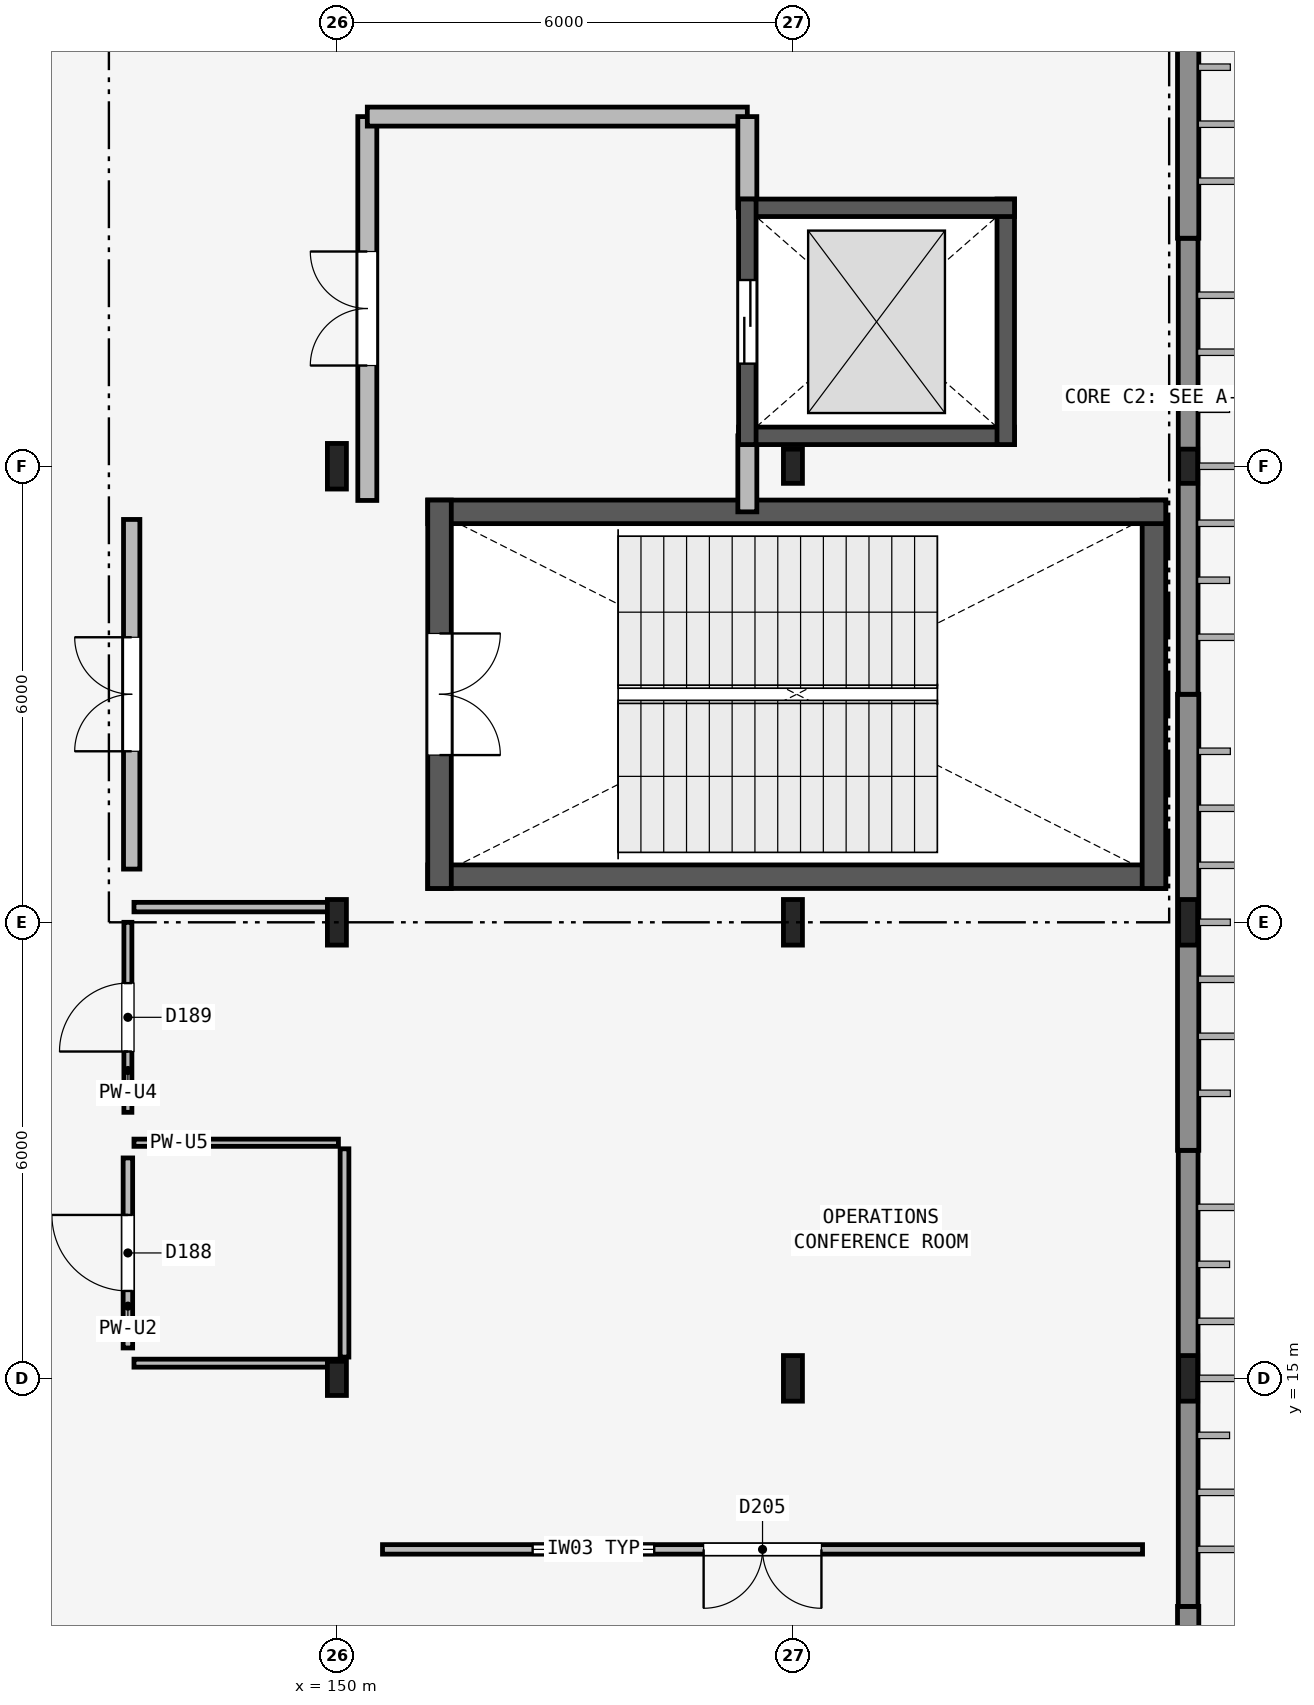
"""IFC4 building model, lengths in metres.
Left out: names, types, materials, properties, quantities, classifications, styles, units other than length and angle.
Written with IfcOpenShell. Run it as: python <this file> out.ifc"""

import sys

from ifc_helpers import new_model, si_unit, direction, frame, frame_2d, origin, origin_2d, place, context, subcontext, project, spatial, rectangle, i_section, extrude, element, fill, save


model = new_model("IFC4")
c1 = context("Model", 3, precision=1e-05, world=origin(), true_north=direction((0.0, 1.0)))
c2 = subcontext(c1, "Body", "Model", "MODEL_VIEW")
j1 = project(units=[si_unit("LENGTHUNIT", "METRE"), si_unit("PLANEANGLEUNIT", "RADIAN")], contexts=[c1])
p1 = place(None, origin())
s1 = spatial("IfcSite", under=j1, at=p1, CompositionType="ELEMENT")
p2 = place(p1, origin())
s2 = spatial("IfcBuilding", under=s1, at=p2, CompositionType="ELEMENT")
p3 = place(p2, frame((0.0, 0.0, 4.8)))
s3 = spatial("IfcBuildingStorey", under=s2, at=p3, CompositionType="ELEMENT", Elevation=4.8)
p4 = place(p3, frame((150.0, 15.0, 0.0), z_axis=(0.0, 0.0, 1.0), x_axis=(1.0, 0.0, 0.0)))
e1 = element("IfcColumn", 1, at=p4, inside=s3, PredefinedType="COLUMN", context=c2, shape_type="SweptSolid", body=[
    extrude(i_section(OverallWidth=0.25, OverallDepth=0.45, WebThickness=0.011, FlangeThickness=0.014, FilletRadius=0.015, at=origin_2d()), origin(), (0.0, 0.0, 1.0), 4.5),
])
for number, where, z_axis, x_axis in (
    (2, (150.0, 21.0, 0.0), (0.0, 0.0, 1.0), (1.0, 0.0, 0.0)),
    (3, (150.0, 27.0, 0.0), (0.0, 0.0, 1.0), (1.0, 0.0, 0.0)),
    (4, (156.0, 15.0, 0.0), (0.0, 0.0, 1.0), (1.0, 0.0, 0.0)),
    (5, (156.0, 21.0, 0.0), (0.0, 0.0, 1.0), (1.0, 0.0, 0.0)),
):
    element("IfcColumn", number, at=place(p3, frame(where, z_axis=z_axis, x_axis=x_axis)), inside=s3, PredefinedType="COLUMN", context=c2, shape_type="SweptSolid", body=[
        extrude(i_section(OverallWidth=0.25, OverallDepth=0.6, WebThickness=0.012, FlangeThickness=0.024, FilletRadius=0.017, at=origin_2d()), origin(), (0.0, 0.0, 1.0), 4.5),
    ])
p5 = place(p3, frame((156.0, 27.0, 0.0), z_axis=(0.0, 0.0, 1.0), x_axis=(1.0, 0.0, 0.0)))
e6 = element("IfcColumn", 6, at=p5, inside=s3, PredefinedType="COLUMN", context=c2, shape_type="SweptSolid", body=[
    extrude(i_section(OverallWidth=0.25, OverallDepth=0.45, WebThickness=0.011, FlangeThickness=0.014, FilletRadius=0.015, at=origin_2d()), origin(), (0.0, 0.0, 1.0), 4.5),
])
for number, where, z_axis, x_axis in (
    (7, (161.2, 15.0, 0.0), (0.0, 0.0, 1.0), (1.0, 0.0, 0.0)),
    (8, (161.2, 21.0, 0.0), (0.0, 0.0, 1.0), (1.0, 0.0, 0.0)),
):
    element("IfcColumn", number, at=place(p3, frame(where, z_axis=z_axis, x_axis=x_axis)), inside=s3, PredefinedType="COLUMN", context=c2, shape_type="SweptSolid", body=[
        extrude(i_section(OverallWidth=0.25, OverallDepth=0.6, WebThickness=0.012, FlangeThickness=0.024, FilletRadius=0.017, at=origin_2d()), origin(), (0.0, 0.0, 1.0), 4.5),
    ])
p6 = place(p3, frame((161.2, 27.0, 0.0), z_axis=(0.0, 0.0, 1.0), x_axis=(1.0, 0.0, 0.0)))
e9 = element("IfcColumn", 9, at=p6, inside=s3, PredefinedType="COLUMN", context=c2, shape_type="SweptSolid", body=[
    extrude(i_section(OverallWidth=0.25, OverallDepth=0.45, WebThickness=0.011, FlangeThickness=0.014, FilletRadius=0.015, at=origin_2d()), origin(), (0.0, 0.0, 1.0), 4.5),
])
p7 = place(p3, frame((161.2, 6.0, 0.0), z_axis=(0.0, 0.0, 1.0), x_axis=(0.0, 1.0, 0.0)))
e10 = element("IfcWall", 10, at=p7, inside=s3, PredefinedType="SOLIDWALL", context=c2, shape_type="SweptSolid", body=[
    extrude(rectangle(XDim=6.0, YDim=0.28, at=frame_2d((3.0, 0.0))), origin(), (0.0, 0.0, 1.0), 3.74),
])
p8 = place(p3, frame((161.2, 12.0, 0.0), z_axis=(0.0, 0.0, 1.0), x_axis=(0.0, 1.0, 0.0)))
e11 = element("IfcWall", 11, at=p8, inside=s3, PredefinedType="SOLIDWALL", context=c2, shape_type="SweptSolid", body=[
    extrude(rectangle(XDim=6.0, YDim=0.26, at=frame_2d((3.0, 0.0))), origin(), (0.0, 0.0, 1.0), 3.74),
])
p9 = place(p3, frame((161.2, 18.0, 0.0), z_axis=(0.0, 0.0, 1.0), x_axis=(0.0, 1.0, 0.0)))
e12 = element("IfcWall", 12, at=p9, inside=s3, PredefinedType="SOLIDWALL", context=c2, shape_type="SweptSolid", body=[
    extrude(rectangle(XDim=6.0, YDim=0.28, at=frame_2d((3.0, 0.0))), origin(), (0.0, 0.0, 1.0), 3.69),
])
p10 = place(p3, frame((161.2, 24.0, 0.0), z_axis=(0.0, 0.0, 1.0), x_axis=(0.0, 1.0, 0.0)))
e13 = element("IfcWall", 13, at=p10, inside=s3, PredefinedType="SOLIDWALL", context=c2, shape_type="SweptSolid", body=[
    extrude(rectangle(XDim=6.0, YDim=0.26, at=frame_2d((3.0, 0.0))), origin(), (0.0, 0.0, 1.0), 3.69),
])
p11 = place(p3, frame((161.2, 30.0, 0.0), z_axis=(0.0, 0.0, 1.0), x_axis=(0.0, 1.0, 0.0)))
e14 = element("IfcWall", 14, at=p11, inside=s3, PredefinedType="SOLIDWALL", context=c2, shape_type="SweptSolid", body=[
    extrude(rectangle(XDim=6.0, YDim=0.28, at=frame_2d((3.0, 0.0))), origin(), (0.0, 0.0, 1.0), 3.74),
])
p12 = place(p3, frame((151.195, 21.6, 0.0), z_axis=(0.0, 0.0, 1.0), x_axis=(1.0, 0.0, 0.0)))
e15 = element("IfcWall", 15, at=p12, inside=s3, PredefinedType="SHEAR", context=c2, shape_type="SweptSolid", body=[
    extrude(rectangle(XDim=9.71, YDim=0.31, at=frame_2d((4.855, 0.0))), origin(), (0.0, 0.0, 1.0), 4.36),
])
p13 = place(p3, frame((160.75, 21.445, 0.0), z_axis=(0.0, 0.0, 1.0), x_axis=(0.0, 1.0, 0.0)))
e16 = element("IfcWall", 16, at=p13, inside=s3, PredefinedType="SHEAR", context=c2, shape_type="SweptSolid", body=[
    extrude(rectangle(XDim=5.11, YDim=0.31, at=frame_2d((2.555, 0.0))), origin(), (0.0, 0.0, 1.0), 4.36),
])
p14 = place(p3, frame((160.905, 26.4, 0.0), z_axis=(0.0, 0.0, 1.0), x_axis=(-1.0, 0.0, 0.0)))
e17 = element("IfcWall", 17, at=p14, inside=s3, PredefinedType="SHEAR", context=c2, shape_type="SweptSolid", body=[
    extrude(rectangle(XDim=9.71, YDim=0.31, at=frame_2d((4.855, 0.0))), origin(), (0.0, 0.0, 1.0), 4.36),
])
p15 = place(p3, frame((151.35, 26.555, 0.0), z_axis=(0.0, 0.0, 1.0), x_axis=(0.0, -1.0, 0.0)))
e18 = element("IfcWall", 18, at=p15, inside=s3, PredefinedType="SHEAR", context=c2, shape_type="SweptSolid", body=[
    extrude(rectangle(XDim=5.11, YDim=0.31, at=frame_2d((2.555, 0.0))), origin(), (0.0, 0.0, 1.0), 4.36),
])
p16 = place(p15, frame((1.755, 0.0, 0.0)))
e19 = element("IfcOpeningElement", 19, at=p16, cuts=e18, PredefinedType="OPENING", context=c2, shape_type="SweptSolid", body=[
    extrude(rectangle(XDim=1.6, YDim=2.2, at=frame_2d((0.8, 1.1))), frame((0.0, 0.165, 0.0), z_axis=(0.0, -1.0, 0.0), x_axis=(1.0, 0.0, 0.0)), (0.0, 0.0, 1.0), 0.33),
])
p17 = place(p3, frame((147.3, 21.7, 0.0), z_axis=(0.0, 0.0, 1.0), x_axis=(0.0, 1.0, 0.0)))
e20 = element("IfcWall", 20, at=p17, inside=s3, PredefinedType="PARTITIONING", context=c2, shape_type="SweptSolid", body=[
    extrude(rectangle(XDim=4.6, YDim=0.215, at=frame_2d((2.3, 0.0))), origin(), (0.0, 0.0, 1.0), 4.19),
])
p18 = place(p17, frame((1.55, 0.0, 0.0)))
e21 = element("IfcOpeningElement", 21, at=p18, cuts=e20, PredefinedType="OPENING", context=c2, shape_type="SweptSolid", body=[
    extrude(rectangle(XDim=1.5, YDim=2.15, at=frame_2d((0.75, 1.075))), frame((0.0, 0.117, 0.0), z_axis=(0.0, -1.0, 0.0), x_axis=(1.0, 0.0, 0.0)), (0.0, 0.0, 1.0), 0.235),
])
p19 = place(p3, frame((150.4, 26.55, 0.0), z_axis=(0.0, 0.0, 1.0), x_axis=(0.0, 1.0, 0.0)))
e22 = element("IfcWall", 22, at=p19, inside=s3, PredefinedType="PARTITIONING", context=c2, shape_type="SweptSolid", body=[
    extrude(rectangle(XDim=5.05, YDim=0.25, at=frame_2d((2.525, 0.0))), origin(), (0.0, 0.0, 1.0), 3.64),
])
p20 = place(p19, frame((1.775, 0.0, 0.0)))
e23 = element("IfcOpeningElement", 23, at=p20, cuts=e22, PredefinedType="OPENING", context=c2, shape_type="SweptSolid", body=[
    extrude(rectangle(XDim=1.5, YDim=2.15, at=frame_2d((0.75, 1.075))), frame((0.0, 0.135, 0.0), z_axis=(0.0, -1.0, 0.0), x_axis=(1.0, 0.0, 0.0)), (0.0, 0.0, 1.0), 0.27),
])
p21 = place(p3, frame((150.4, 31.6, 0.0), z_axis=(0.0, 0.0, 1.0), x_axis=(1.0, 0.0, 0.0)))
e24 = element("IfcWall", 24, at=p21, inside=s3, PredefinedType="PARTITIONING", context=c2, shape_type="SweptSolid", body=[
    extrude(rectangle(XDim=5.0, YDim=0.25, at=frame_2d((2.5, 0.0))), origin(), (0.0, 0.0, 1.0), 3.84),
])
p22 = place(p3, frame((155.4, 30.4, 0.0), z_axis=(0.0, 0.0, 1.0), x_axis=(0.0, 1.0, 0.0)))
e25 = element("IfcWall", 25, at=p22, inside=s3, PredefinedType="PARTITIONING", context=c2, shape_type="SweptSolid", body=[
    extrude(rectangle(XDim=1.2, YDim=0.25, at=frame_2d((0.6, 0.0))), origin(), (0.0, 0.0, 1.0), 4.19),
])
p23 = place(p3, frame((155.4, 26.4, 0.0), z_axis=(0.0, 0.0, 1.0), x_axis=(0.0, 1.0, 0.0)))
e26 = element("IfcWall", 26, at=p23, inside=s3, PredefinedType="PARTITIONING", context=c2, shape_type="SweptSolid", body=[
    extrude(rectangle(XDim=1.0, YDim=0.25, at=frame_2d((0.5, 0.0))), origin(), (0.0, 0.0, 1.0), 3.64),
])
p24 = place(p3, frame((155.285, 27.4, 0.0), z_axis=(0.0, 0.0, 1.0), x_axis=(1.0, 0.0, 0.0)))
e27 = element("IfcWall", 27, at=p24, inside=s3, PredefinedType="SHEAR", context=c2, shape_type="SweptSolid", body=[
    extrude(rectangle(XDim=3.63, YDim=0.23, at=frame_2d((1.815, 0.0))), origin(), (0.0, 0.0, 1.0), 4.5),
])
p25 = place(p3, frame((158.8, 27.285, 0.0), z_axis=(0.0, 0.0, 1.0), x_axis=(0.0, 1.0, 0.0)))
e28 = element("IfcWall", 28, at=p25, inside=s3, PredefinedType="SHEAR", context=c2, shape_type="SweptSolid", body=[
    extrude(rectangle(XDim=3.23, YDim=0.23, at=frame_2d((1.615, 0.0))), origin(), (0.0, 0.0, 1.0), 4.5),
])
p26 = place(p3, frame((158.915, 30.4, 0.0), z_axis=(0.0, 0.0, 1.0), x_axis=(-1.0, 0.0, 0.0)))
e29 = element("IfcWall", 29, at=p26, inside=s3, PredefinedType="SHEAR", context=c2, shape_type="SweptSolid", body=[
    extrude(rectangle(XDim=3.63, YDim=0.23, at=frame_2d((1.815, 0.0))), origin(), (0.0, 0.0, 1.0), 4.5),
])
p27 = place(p3, frame((155.4, 30.515, 0.0), z_axis=(0.0, 0.0, 1.0), x_axis=(0.0, -1.0, 0.0)))
e30 = element("IfcWall", 30, at=p27, inside=s3, PredefinedType="SHEAR", context=c2, shape_type="SweptSolid", body=[
    extrude(rectangle(XDim=3.23, YDim=0.23, at=frame_2d((1.615, 0.0))), origin(), (0.0, 0.0, 1.0), 4.5),
])
p28 = place(p27, frame((1.065, 0.0, 0.0)))
e31 = element("IfcOpeningElement", 31, at=p28, cuts=e30, PredefinedType="OPENING", context=c2, shape_type="SweptSolid", body=[
    extrude(rectangle(XDim=1.1, YDim=2.2, at=frame_2d((0.55, 1.1))), frame((0.0, 0.125, 0.0), z_axis=(0.0, -1.0, 0.0), x_axis=(1.0, 0.0, 0.0)), (0.0, 0.0, 1.0), 0.25),
])
p29 = place(p3, frame((147.25, 15.4, 0.0), z_axis=(0.0, 0.0, 1.0), x_axis=(0.0, 1.0, 0.0)))
e32 = element("IfcWall", 32, at=p29, inside=s3, PredefinedType="PARTITIONING", context=c2, shape_type="SweptSolid", body=[
    extrude(rectangle(XDim=2.5, YDim=0.125, at=frame_2d((1.25, 0.0))), origin(), (0.0, 0.0, 1.0), 4.19),
])
p30 = place(p29, frame((0.75, 0.0, 0.0)))
e33 = element("IfcOpeningElement", 33, at=p30, cuts=e32, PredefinedType="OPENING", context=c2, shape_type="SweptSolid", body=[
    extrude(rectangle(XDim=1.0, YDim=2.1, at=frame_2d((0.5, 1.05))), frame((0.0, 0.073, 0.0), z_axis=(0.0, -1.0, 0.0), x_axis=(1.0, 0.0, 0.0)), (0.0, 0.0, 1.0), 0.145),
])
p31 = place(p3, frame((147.25, 18.5, 0.0), z_axis=(0.0, 0.0, 1.0), x_axis=(0.0, 1.0, 0.0)))
e34 = element("IfcWall", 34, at=p31, inside=s3, PredefinedType="PARTITIONING", context=c2, shape_type="SweptSolid", body=[
    extrude(rectangle(XDim=2.5, YDim=0.105, at=frame_2d((1.25, 0.0))), origin(), (0.0, 0.0, 1.0), 3.59),
])
p32 = place(p31, frame((0.8, 0.0, 0.0)))
e35 = element("IfcOpeningElement", 35, at=p32, cuts=e34, PredefinedType="OPENING", context=c2, shape_type="SweptSolid", body=[
    extrude(rectangle(XDim=0.9, YDim=2.1, at=frame_2d((0.45, 1.05))), frame((0.0, 0.062, 0.0), z_axis=(0.0, -1.0, 0.0), x_axis=(1.0, 0.0, 0.0)), (0.0, 0.0, 1.0), 0.125),
])
p33 = place(p3, frame((160.6, 12.75, 0.0), z_axis=(0.0, 0.0, 1.0), x_axis=(-1.0, 0.0, 0.0)))
e36 = element("IfcWall", 36, at=p33, inside=s3, PredefinedType="PARTITIONING", context=c2, shape_type="SweptSolid", body=[
    extrude(rectangle(XDim=10.0, YDim=0.125, at=frame_2d((5.0, 0.0))), origin(), (0.0, 0.0, 1.0), 3.783),
])
p34 = place(p33, frame((4.225, 0.0, 0.0)))
e37 = element("IfcOpeningElement", 37, at=p34, cuts=e36, PredefinedType="OPENING", context=c2, shape_type="SweptSolid", body=[
    extrude(rectangle(XDim=1.55, YDim=2.2, at=frame_2d((0.775, 1.1))), frame((0.0, 0.073, 0.0), z_axis=(0.0, -1.0, 0.0), x_axis=(1.0, 0.0, 0.0)), (0.0, 0.0, 1.0), 0.145),
])
p35 = place(p33, frame((6.425, 0.0, 1.05)))
e38 = element("IfcOpeningElement", 38, at=p35, cuts=e36, PredefinedType="OPENING", context=c2, shape_type="SweptSolid", body=[
    extrude(rectangle(XDim=1.6, YDim=1.1, at=frame_2d((0.8, 0.55))), frame((0.0, 0.073, 0.0), z_axis=(0.0, -1.0, 0.0), x_axis=(1.0, 0.0, 0.0)), (0.0, 0.0, 1.0), 0.145),
])
p36 = place(p3, frame((150.1, 18.02, 0.0), z_axis=(0.0, 0.0, 1.0), x_axis=(0.0, -1.0, 0.0)))
e39 = element("IfcWall", 39, at=p36, inside=s3, PredefinedType="PARTITIONING", context=c2, shape_type="SweptSolid", body=[
    extrude(rectangle(XDim=2.74, YDim=0.115, at=frame_2d((1.37, 0.0))), origin(), (0.0, 0.0, 1.0), 3.783),
])
p37 = place(p3, frame((150.02, 15.2, 0.0), z_axis=(0.0, 0.0, 1.0), x_axis=(-1.0, 0.0, 0.0)))
e40 = element("IfcWall", 40, at=p37, inside=s3, PredefinedType="PARTITIONING", context=c2, shape_type="SweptSolid", body=[
    extrude(rectangle(XDim=2.69, YDim=0.105, at=frame_2d((1.345, 0.0))), origin(), (0.0, 0.0, 1.0), 3.59),
])
p38 = place(p3, frame((147.33, 18.1, 0.0), z_axis=(0.0, 0.0, 1.0), x_axis=(1.0, 0.0, 0.0)))
e41 = element("IfcWall", 41, at=p38, inside=s3, PredefinedType="PARTITIONING", context=c2, shape_type="SweptSolid", body=[
    extrude(rectangle(XDim=2.69, YDim=0.095, at=frame_2d((1.345, 0.0))), origin(), (0.0, 0.0, 1.0), 3.866),
])
p39 = place(p3, frame((147.33, 21.2, 0.0), z_axis=(0.0, 0.0, 1.0), x_axis=(1.0, 0.0, 0.0)))
e42 = element("IfcWall", 42, at=p39, inside=s3, PredefinedType="PARTITIONING", context=c2, shape_type="SweptSolid", body=[
    extrude(rectangle(XDim=2.69, YDim=0.125, at=frame_2d((1.345, 0.0))), origin(), (0.0, 0.0, 1.0), 3.59),
])
p40 = place(p16, origin())
e43 = element("IfcDoor", 43, at=p40, inside=s3, OperationType="DOUBLE_DOOR_SINGLE_SWING", PredefinedType="DOOR", context=c2, shape_type="SweptSolid", body=[
    extrude(rectangle(XDim=1.6, YDim=2.2, at=frame_2d((0.8, 1.1))), frame((0.0, 0.025, 0.0), z_axis=(0.0, -1.0, 0.0), x_axis=(1.0, 0.0, 0.0)), (0.0, 0.0, 1.0), 0.05),
])
fill(e19, e43)
p41 = place(p18, origin())
e44 = element("IfcDoor", 44, at=p41, inside=s3, OperationType="DOUBLE_DOOR_SINGLE_SWING", PredefinedType="DOOR", context=c2, shape_type="SweptSolid", body=[
    extrude(rectangle(XDim=1.5, YDim=2.15, at=frame_2d((0.75, 1.075))), frame((0.0, 0.025, 0.0), z_axis=(0.0, -1.0, 0.0), x_axis=(1.0, 0.0, 0.0)), (0.0, 0.0, 1.0), 0.05),
])
fill(e21, e44)
p42 = place(p20, origin())
e45 = element("IfcDoor", 45, at=p42, inside=s3, OperationType="DOUBLE_DOOR_SINGLE_SWING", PredefinedType="DOOR", context=c2, shape_type="SweptSolid", body=[
    extrude(rectangle(XDim=1.5, YDim=2.15, at=frame_2d((0.75, 1.075))), frame((0.0, 0.025, 0.0), z_axis=(0.0, -1.0, 0.0), x_axis=(1.0, 0.0, 0.0)), (0.0, 0.0, 1.0), 0.05),
])
fill(e23, e45)
p43 = place(p28, origin())
e46 = element("IfcDoor", 46, at=p43, inside=s3, OperationType="SLIDING_TO_LEFT", PredefinedType="DOOR", context=c2, shape_type="SweptSolid", body=[
    extrude(rectangle(XDim=1.1, YDim=2.2, at=frame_2d((0.55, 1.1))), frame((0.0, 0.025, 0.0), z_axis=(0.0, -1.0, 0.0), x_axis=(1.0, 0.0, 0.0)), (0.0, 0.0, 1.0), 0.05),
])
fill(e31, e46)
p44 = place(p30, origin())
e47 = element("IfcDoor", 47, at=p44, inside=s3, OperationType="SINGLE_SWING_RIGHT", PredefinedType="DOOR", context=c2, shape_type="SweptSolid", body=[
    extrude(rectangle(XDim=1.0, YDim=2.1, at=frame_2d((0.5, 1.05))), frame((0.0, 0.025, 0.0), z_axis=(0.0, -1.0, 0.0), x_axis=(1.0, 0.0, 0.0)), (0.0, 0.0, 1.0), 0.05),
])
fill(e33, e47)
p45 = place(p32, origin())
e48 = element("IfcDoor", 48, at=p45, inside=s3, OperationType="SINGLE_SWING_LEFT", PredefinedType="DOOR", context=c2, shape_type="SweptSolid", body=[
    extrude(rectangle(XDim=0.9, YDim=2.1, at=frame_2d((0.45, 1.05))), frame((0.0, 0.025, 0.0), z_axis=(0.0, -1.0, 0.0), x_axis=(1.0, 0.0, 0.0)), (0.0, 0.0, 1.0), 0.05),
])
fill(e35, e48)
p46 = place(p34, origin())
e49 = element("IfcDoor", 49, at=p46, inside=s3, OperationType="DOUBLE_DOOR_SINGLE_SWING", PredefinedType="DOOR", context=c2, shape_type="SweptSolid", body=[
    extrude(rectangle(XDim=1.55, YDim=2.2, at=frame_2d((0.775, 1.1))), frame((0.0, 0.025, 0.0), z_axis=(0.0, -1.0, 0.0), x_axis=(1.0, 0.0, 0.0)), (0.0, 0.0, 1.0), 0.05),
])
fill(e37, e49)
p47 = place(p35, origin())
e50 = element("IfcWindow", 50, at=p47, inside=s3, PartitioningType="SINGLE_PANEL", PredefinedType="WINDOW", context=c2, shape_type="SweptSolid", body=[
    extrude(rectangle(XDim=1.6, YDim=1.1, at=frame_2d((0.8, 0.55))), frame((0.0, 0.03, 0.0), z_axis=(0.0, -1.0, 0.0), x_axis=(1.0, 0.0, 0.0)), (0.0, 0.0, 1.0), 0.06),
])
fill(e38, e50)
save(model, sys.argv[1])
